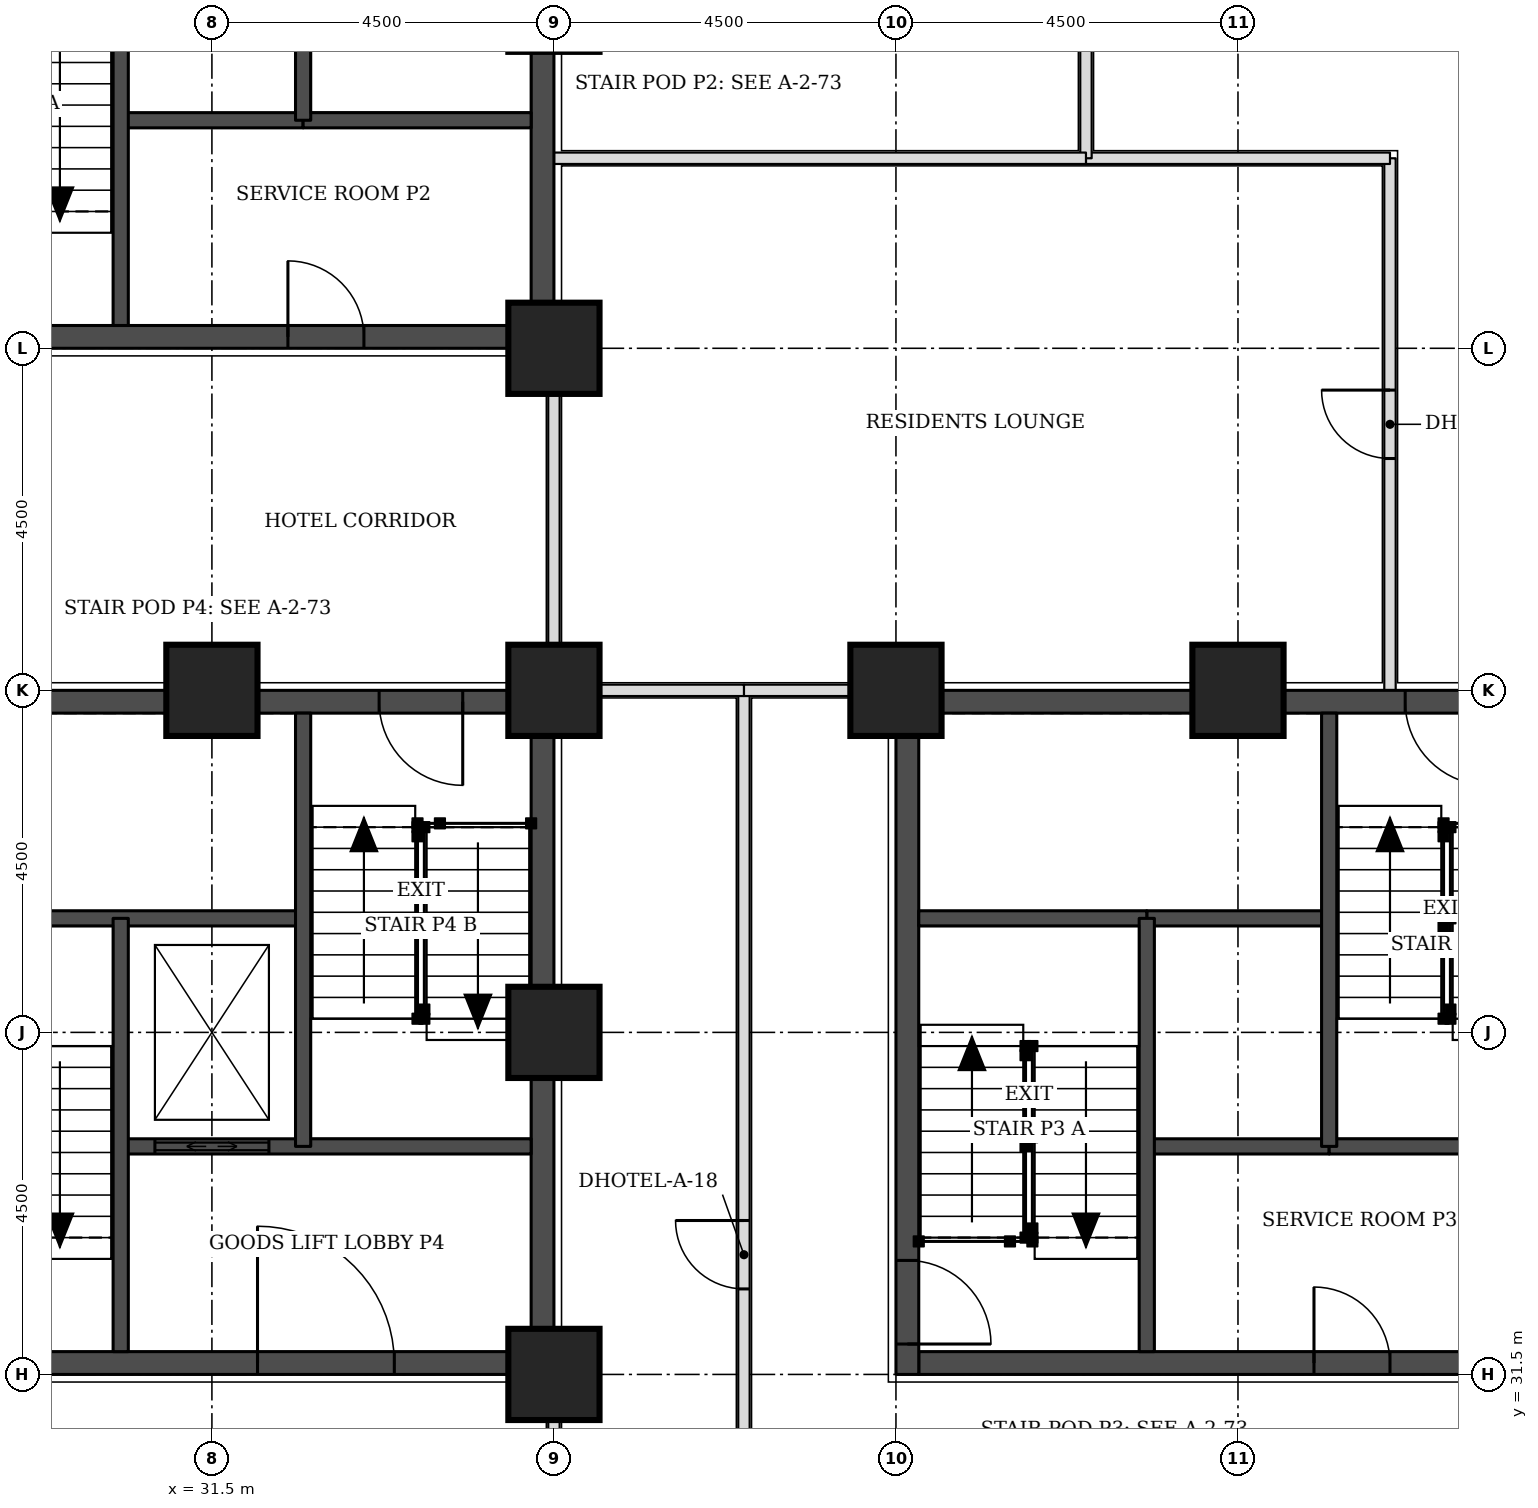
"""IFC4 building model, lengths in metres.
Left out: names, types, materials, properties, quantities, classifications, styles, units other than length and angle.
Written with IfcOpenShell. Run it as: python <this file> out.ifc"""

import sys

from ifc_helpers import new_model, si_unit, direction, frame, frame_2d, origin, origin_2d, place, context, subcontext, project, spatial, rectangle, extrude, element, fill, save


model = new_model("IFC4")
c1 = context("Model", 3, precision=1e-05, world=origin(), true_north=direction((0.0, 1.0)))
c2 = subcontext(c1, "Body", "Model", "MODEL_VIEW")
j1 = project(units=[si_unit("LENGTHUNIT", "METRE"), si_unit("PLANEANGLEUNIT", "RADIAN")], contexts=[c1])
p1 = place(None, origin())
s1 = spatial("IfcSite", under=j1, at=p1, CompositionType="ELEMENT")
p2 = place(p1, origin())
s2 = spatial("IfcBuilding", under=s1, at=p2, CompositionType="ELEMENT")
p3 = place(p2, frame((0.0, 0.0, 26.4)))
s3 = spatial("IfcBuildingStorey", under=s2, at=p3, CompositionType="ELEMENT", Elevation=26.4)
for number, where, z_axis, x_axis in (
    (1, (36.0, 31.5, 0.0), (0.0, 0.0, 1.0), (1.0, 0.0, 0.0)),
    (2, (36.0, 36.0, 0.0), (0.0, 0.0, 1.0), (1.0, 0.0, 0.0)),
    (3, (31.5, 40.5, 0.0), (0.0, 0.0, 1.0), (1.0, 0.0, 0.0)),
    (4, (36.0, 40.5, 0.0), (0.0, 0.0, 1.0), (1.0, 0.0, 0.0)),
    (5, (40.5, 40.5, 0.0), (0.0, 0.0, 1.0), (1.0, 0.0, 0.0)),
    (6, (45.0, 40.5, 0.0), (0.0, 0.0, 1.0), (1.0, 0.0, 0.0)),
    (7, (36.0, 45.0, 0.0), (0.0, 0.0, 1.0), (1.0, 0.0, 0.0)),
):
    element("IfcColumn", number, at=place(p3, frame(where, z_axis=z_axis, x_axis=x_axis)), inside=s3, PredefinedType="COLUMN", context=c2, shape_type="SweptSolid", body=[
        extrude(rectangle(XDim=1.2, YDim=1.2, at=origin_2d()), origin(), (0.0, 0.0, 1.0), 3.3),
    ])
p4 = place(p3, frame((27.3, 45.15, 0.0), z_axis=(0.0, 0.0, 1.0), x_axis=(1.0, 0.0, 0.0)))
e8 = element("IfcWall", 8, at=p4, inside=s3, PredefinedType="SHEAR", context=c2, shape_type="SweptSolid", body=[
    extrude(rectangle(XDim=8.4, YDim=0.3, at=frame_2d((4.2, 0.0))), origin(), (0.0, 0.0, 1.0), 3.3),
])
p5 = place(p4, frame((5.2, 0.0, 0.0)))
e9 = element("IfcOpeningElement", 9, at=p5, cuts=e8, PredefinedType="OPENING", context=c2, shape_type="SweptSolid", body=[
    extrude(rectangle(XDim=1.0, YDim=2.1, at=frame_2d((0.5, 1.05))), frame((0.0, 0.16, 0.0), z_axis=(0.0, -1.0, 0.0), x_axis=(1.0, 0.0, 0.0)), (0.0, 0.0, 1.0), 0.32),
])
p6 = place(p3, frame((35.85, 45.0, 0.0), z_axis=(0.0, 0.0, 1.0), x_axis=(0.0, 1.0, 0.0)))
e10 = element("IfcWall", 10, at=p6, inside=s3, PredefinedType="SHEAR", context=c2, shape_type="SweptSolid", body=[
    extrude(rectangle(XDim=9.0, YDim=0.3, at=frame_2d((4.5, 0.0))), origin(), (0.0, 0.0, 1.0), 3.3),
])
p7 = place(p3, frame((40.8, 31.65, 0.0), z_axis=(0.0, 0.0, 1.0), x_axis=(1.0, 0.0, 0.0)))
e11 = element("IfcWall", 11, at=p7, inside=s3, PredefinedType="SHEAR", context=c2, shape_type="SweptSolid", body=[
    extrude(rectangle(XDim=8.4, YDim=0.3, at=frame_2d((4.2, 0.0))), origin(), (0.0, 0.0, 1.0), 3.3),
])
p8 = place(p7, frame((5.2, 0.0, 0.0)))
e12 = element("IfcOpeningElement", 12, at=p8, cuts=e11, PredefinedType="OPENING", context=c2, shape_type="SweptSolid", body=[
    extrude(rectangle(XDim=1.0, YDim=2.1, at=frame_2d((0.5, 1.05))), frame((0.0, 0.16, 0.0), z_axis=(0.0, -1.0, 0.0), x_axis=(1.0, 0.0, 0.0)), (0.0, 0.0, 1.0), 0.32),
])
p9 = place(p3, frame((40.8, 40.35, 0.0), z_axis=(0.0, 0.0, 1.0), x_axis=(1.0, 0.0, 0.0)))
e13 = element("IfcWall", 13, at=p9, inside=s3, PredefinedType="SHEAR", context=c2, shape_type="SweptSolid", body=[
    extrude(rectangle(XDim=8.4, YDim=0.3, at=frame_2d((4.2, 0.0))), origin(), (0.0, 0.0, 1.0), 3.3),
])
p10 = place(p9, frame((6.4, 0.0, 0.0)))
e14 = element("IfcOpeningElement", 14, at=p10, cuts=e13, PredefinedType="OPENING", context=c2, shape_type="SweptSolid", body=[
    extrude(rectangle(XDim=1.1, YDim=2.1, at=frame_2d((0.55, 1.05))), frame((0.0, 0.16, 0.0), z_axis=(0.0, -1.0, 0.0), x_axis=(1.0, 0.0, 0.0)), (0.0, 0.0, 1.0), 0.32),
])
p11 = place(p3, frame((40.65, 31.5, 0.0), z_axis=(0.0, 0.0, 1.0), x_axis=(0.0, 1.0, 0.0)))
e15 = element("IfcWall", 15, at=p11, inside=s3, PredefinedType="SHEAR", context=c2, shape_type="SweptSolid", body=[
    extrude(rectangle(XDim=9.0, YDim=0.3, at=frame_2d((4.5, 0.0))), origin(), (0.0, 0.0, 1.0), 3.3),
])
p12 = place(p11, frame((0.4, 0.0, 0.0)))
e16 = element("IfcOpeningElement", 16, at=p12, cuts=e15, PredefinedType="OPENING", context=c2, shape_type="SweptSolid", body=[
    extrude(rectangle(XDim=1.1, YDim=2.1, at=frame_2d((0.55, 1.05))), frame((0.0, 0.16, 0.0), z_axis=(0.0, -1.0, 0.0), x_axis=(1.0, 0.0, 0.0)), (0.0, 0.0, 1.0), 0.32),
])
p13 = place(p3, frame((27.3, 31.65, 0.0), z_axis=(0.0, 0.0, 1.0), x_axis=(1.0, 0.0, 0.0)))
e17 = element("IfcWall", 17, at=p13, inside=s3, PredefinedType="SHEAR", context=c2, shape_type="SweptSolid", body=[
    extrude(rectangle(XDim=8.4, YDim=0.3, at=frame_2d((4.2, 0.0))), origin(), (0.0, 0.0, 1.0), 3.3),
])
p14 = place(p13, frame((4.8, 0.0, 0.0)))
e18 = element("IfcOpeningElement", 18, at=p14, cuts=e17, PredefinedType="OPENING", context=c2, shape_type="SweptSolid", body=[
    extrude(rectangle(XDim=1.8, YDim=2.1, at=frame_2d((0.9, 1.05))), frame((0.0, 0.16, 0.0), z_axis=(0.0, -1.0, 0.0), x_axis=(1.0, 0.0, 0.0)), (0.0, 0.0, 1.0), 0.32),
])
p15 = place(p3, frame((27.3, 40.35, 0.0), z_axis=(0.0, 0.0, 1.0), x_axis=(1.0, 0.0, 0.0)))
e19 = element("IfcWall", 19, at=p15, inside=s3, PredefinedType="SHEAR", context=c2, shape_type="SweptSolid", body=[
    extrude(rectangle(XDim=8.4, YDim=0.3, at=frame_2d((4.2, 0.0))), origin(), (0.0, 0.0, 1.0), 3.3),
])
p16 = place(p15, frame((6.4, 0.0, 0.0)))
e20 = element("IfcOpeningElement", 20, at=p16, cuts=e19, PredefinedType="OPENING", context=c2, shape_type="SweptSolid", body=[
    extrude(rectangle(XDim=1.1, YDim=2.1, at=frame_2d((0.55, 1.05))), frame((0.0, 0.16, 0.0), z_axis=(0.0, -1.0, 0.0), x_axis=(1.0, 0.0, 0.0)), (0.0, 0.0, 1.0), 0.32),
])
p17 = place(p3, frame((35.85, 31.5, 0.0), z_axis=(0.0, 0.0, 1.0), x_axis=(0.0, 1.0, 0.0)))
e21 = element("IfcWall", 21, at=p17, inside=s3, PredefinedType="SHEAR", context=c2, shape_type="SweptSolid", body=[
    extrude(rectangle(XDim=9.0, YDim=0.3, at=frame_2d((4.5, 0.0))), origin(), (0.0, 0.0, 1.0), 3.3),
])
p18 = place(p3, frame((38.5, 25.65, 0.0), z_axis=(0.0, 0.0, 1.0), x_axis=(0.0, 1.0, 0.0)))
e22 = element("IfcWall", 22, at=p18, inside=s3, PredefinedType="PARTITIONING", context=c2, shape_type="SweptSolid", body=[
    extrude(rectangle(XDim=14.85, YDim=0.15, at=frame_2d((7.425, 0.0))), origin(), (0.0, 0.0, 1.0), 3.08),
])
p19 = place(p18, frame((6.975, 0.0, 0.0)))
e23 = element("IfcOpeningElement", 23, at=p19, cuts=e22, PredefinedType="OPENING", context=c2, shape_type="SweptSolid", body=[
    extrude(rectangle(XDim=0.9, YDim=2.1, at=frame_2d((0.45, 1.05))), frame((0.0, 0.085, 0.0), z_axis=(0.0, -1.0, 0.0), x_axis=(1.0, 0.0, 0.0)), (0.0, 0.0, 1.0), 0.17),
])
for number, where, z_axis, x_axis in (
    (24, (36.0, 29.5, 0.0), (0.0, 0.0, 1.0), (0.0, 1.0, 0.0)),
    (25, (38.5, 40.5, 0.0), (0.0, 0.0, 1.0), (1.0, 0.0, 0.0)),
):
    element("IfcWall", number, at=place(p3, frame(where, z_axis=z_axis, x_axis=x_axis)), inside=s3, PredefinedType="PARTITIONING", context=c2, shape_type="SweptSolid", body=[
        extrude(rectangle(XDim=1.95, YDim=0.15, at=frame_2d((0.975, 0.0))), origin(), (0.0, 0.0, 1.0), 2.33),
    ])
p20 = place(p3, frame((36.0, 40.55, 0.0), z_axis=(0.0, 0.0, 1.0), x_axis=(0.0, 1.0, 0.0)))
e26 = element("IfcWall", 26, at=p20, inside=s3, PredefinedType="PARTITIONING", context=c2, shape_type="SweptSolid", body=[
    extrude(rectangle(XDim=4.4, YDim=0.15, at=frame_2d((2.2, 0.0))), origin(), (0.0, 0.0, 1.0), 2.33),
])
p21 = place(p3, frame((47.0, 40.5, 0.0), z_axis=(0.0, 0.0, 1.0), x_axis=(0.0, 1.0, 0.0)))
e27 = element("IfcWall", 27, at=p21, inside=s3, PredefinedType="PARTITIONING", context=c2, shape_type="SweptSolid", body=[
    extrude(rectangle(XDim=7.0, YDim=0.15, at=frame_2d((3.5, 0.0))), origin(), (0.0, 0.0, 1.0), 3.08),
])
p22 = place(p21, frame((3.05, 0.0, 0.0)))
e28 = element("IfcOpeningElement", 28, at=p22, cuts=e27, PredefinedType="OPENING", context=c2, shape_type="SweptSolid", body=[
    extrude(rectangle(XDim=0.9, YDim=2.1, at=frame_2d((0.45, 1.05))), frame((0.0, 0.085, 0.0), z_axis=(0.0, -1.0, 0.0), x_axis=(1.0, 0.0, 0.0)), (0.0, 0.0, 1.0), 0.17),
])
p23 = place(p3, frame((43.0, 47.5, 0.0), z_axis=(0.0, 0.0, 1.0), x_axis=(1.0, 0.0, 0.0)))
e29 = element("IfcWall", 29, at=p23, inside=s3, PredefinedType="PARTITIONING", context=c2, shape_type="SweptSolid", body=[
    extrude(rectangle(XDim=4.0, YDim=0.15, at=frame_2d((2.0, 0.0))), origin(), (0.0, 0.0, 1.0), 3.08),
])
p24 = place(p3, frame((43.0, 47.5, 0.0), z_axis=(0.0, 0.0, 1.0), x_axis=(0.0, 1.0, 0.0)))
e30 = element("IfcWall", 30, at=p24, inside=s3, PredefinedType="PARTITIONING", context=c2, shape_type="SweptSolid", body=[
    extrude(rectangle(XDim=6.5, YDim=0.15, at=frame_2d((3.25, 0.0))), origin(), (0.0, 0.0, 1.0), 3.08),
])
p25 = place(p3, frame((36.05, 40.5, 0.0), z_axis=(0.0, 0.0, 1.0), x_axis=(1.0, 0.0, 0.0)))
e31 = element("IfcWall", 31, at=p25, inside=s3, PredefinedType="PARTITIONING", context=c2, shape_type="SweptSolid", body=[
    extrude(rectangle(XDim=2.45, YDim=0.15, at=frame_2d((1.225, 0.0))), origin(), (0.0, 0.0, 1.0), 2.33),
])
p26 = place(p3, frame((36.0, 47.5, 0.0), z_axis=(0.0, 0.0, 1.0), x_axis=(1.0, 0.0, 0.0)))
e32 = element("IfcWall", 32, at=p26, inside=s3, PredefinedType="PARTITIONING", context=c2, shape_type="SweptSolid", body=[
    extrude(rectangle(XDim=7.0, YDim=0.15, at=frame_2d((3.5, 0.0))), origin(), (0.0, 0.0, 1.0), 3.08),
])
p27 = place(p3, frame((30.3, 48.0, 0.0), z_axis=(0.0, 0.0, 1.0), x_axis=(1.0, 0.0, 0.0)))
e33 = element("IfcWall", 33, at=p27, inside=s3, PredefinedType="SOLIDWALL", context=c2, shape_type="SweptSolid", body=[
    extrude(rectangle(XDim=2.4, YDim=0.2, at=frame_2d((1.2, 0.0))), origin(), (0.0, 0.0, 1.0), 3.08),
])
p28 = place(p3, frame((32.7, 48.0, 0.0), z_axis=(0.0, 0.0, 1.0), x_axis=(1.0, 0.0, 0.0)))
e34 = element("IfcWall", 34, at=p28, inside=s3, PredefinedType="SOLIDWALL", context=c2, shape_type="SweptSolid", body=[
    extrude(rectangle(XDim=3.0, YDim=0.2, at=frame_2d((1.5, 0.0))), origin(), (0.0, 0.0, 1.0), 3.08),
])
for number, where, z_axis, x_axis in (
    (35, (30.3, 45.3, 0.0), (0.0, 0.0, 1.0), (0.0, 1.0, 0.0)),
    (36, (32.7, 48.0, 0.0), (0.0, 0.0, 1.0), (0.0, 1.0, 0.0)),
):
    element("IfcWall", number, at=place(p3, frame(where, z_axis=z_axis, x_axis=x_axis)), inside=s3, PredefinedType="SOLIDWALL", context=c2, shape_type="SweptSolid", body=[
        extrude(rectangle(XDim=5.7, YDim=0.2, at=frame_2d((2.85, 0.0))), origin(), (0.0, 0.0, 1.0), 3.08),
    ])
p29 = place(p3, frame((43.8, 34.5, 0.0), z_axis=(0.0, 0.0, 1.0), x_axis=(1.0, 0.0, 0.0)))
e37 = element("IfcWall", 37, at=p29, inside=s3, PredefinedType="SOLIDWALL", context=c2, shape_type="SweptSolid", body=[
    extrude(rectangle(XDim=2.4, YDim=0.2, at=frame_2d((1.2, 0.0))), origin(), (0.0, 0.0, 1.0), 3.08),
])
p30 = place(p3, frame((46.2, 34.5, 0.0), z_axis=(0.0, 0.0, 1.0), x_axis=(1.0, 0.0, 0.0)))
e38 = element("IfcWall", 38, at=p30, inside=s3, PredefinedType="SOLIDWALL", context=c2, shape_type="SweptSolid", body=[
    extrude(rectangle(XDim=3.0, YDim=0.2, at=frame_2d((1.5, 0.0))), origin(), (0.0, 0.0, 1.0), 3.08),
])
p31 = place(p3, frame((43.8, 37.5, 0.0), z_axis=(0.0, 0.0, 1.0), x_axis=(1.0, 0.0, 0.0)))
e39 = element("IfcWall", 39, at=p31, inside=s3, PredefinedType="SOLIDWALL", context=c2, shape_type="SweptSolid", body=[
    extrude(rectangle(XDim=2.4, YDim=0.2, at=frame_2d((1.2, 0.0))), origin(), (0.0, 0.0, 1.0), 3.3),
])
p32 = place(p3, frame((40.8, 37.5, 0.0), z_axis=(0.0, 0.0, 1.0), x_axis=(1.0, 0.0, 0.0)))
e40 = element("IfcWall", 40, at=p32, inside=s3, PredefinedType="SOLIDWALL", context=c2, shape_type="SweptSolid", body=[
    extrude(rectangle(XDim=3.0, YDim=0.2, at=frame_2d((1.5, 0.0))), origin(), (0.0, 0.0, 1.0), 3.08),
])
for number, where, z_axis, x_axis in (
    (41, (43.8, 31.8, 0.0), (0.0, 0.0, 1.0), (0.0, 1.0, 0.0)),
    (42, (46.2, 34.5, 0.0), (0.0, 0.0, 1.0), (0.0, 1.0, 0.0)),
):
    element("IfcWall", number, at=place(p3, frame(where, z_axis=z_axis, x_axis=x_axis)), inside=s3, PredefinedType="SOLIDWALL", context=c2, shape_type="SweptSolid", body=[
        extrude(rectangle(XDim=5.7, YDim=0.2, at=frame_2d((2.85, 0.0))), origin(), (0.0, 0.0, 1.0), 3.08),
    ])
p33 = place(p3, frame((30.3, 34.5, 0.0), z_axis=(0.0, 0.0, 1.0), x_axis=(1.0, 0.0, 0.0)))
e43 = element("IfcWall", 43, at=p33, inside=s3, PredefinedType="SOLIDWALL", context=c2, shape_type="SweptSolid", body=[
    extrude(rectangle(XDim=5.4, YDim=0.2, at=frame_2d((2.7, 0.0))), origin(), (0.0, 0.0, 1.0), 3.08),
])
p34 = place(p33, frame((0.45, 0.0, 0.0)))
e44 = element("IfcOpeningElement", 44, at=p34, cuts=e43, PredefinedType="OPENING", context=c2, shape_type="SweptSolid", body=[
    extrude(rectangle(XDim=1.5, YDim=2.1, at=frame_2d((0.75, 1.05))), frame((0.0, 0.11, 0.0), z_axis=(0.0, -1.0, 0.0), x_axis=(1.0, 0.0, 0.0)), (0.0, 0.0, 1.0), 0.22),
])
p35 = place(p3, frame((27.3, 37.5, 0.0), z_axis=(0.0, 0.0, 1.0), x_axis=(1.0, 0.0, 0.0)))
e45 = element("IfcWall", 45, at=p35, inside=s3, PredefinedType="SOLIDWALL", context=c2, shape_type="SweptSolid", body=[
    extrude(rectangle(XDim=5.4, YDim=0.2, at=frame_2d((2.7, 0.0))), origin(), (0.0, 0.0, 1.0), 3.08),
])
for number, where, z_axis, x_axis in (
    (46, (30.3, 31.8, 0.0), (0.0, 0.0, 1.0), (0.0, 1.0, 0.0)),
    (47, (32.7, 34.5, 0.0), (0.0, 0.0, 1.0), (0.0, 1.0, 0.0)),
):
    element("IfcWall", number, at=place(p3, frame(where, z_axis=z_axis, x_axis=x_axis)), inside=s3, PredefinedType="SOLIDWALL", context=c2, shape_type="SweptSolid", body=[
        extrude(rectangle(XDim=5.7, YDim=0.2, at=frame_2d((2.85, 0.0))), origin(), (0.0, 0.0, 1.0), 3.08),
    ])
p36 = place(p19, origin())
e48 = element("IfcDoor", 48, at=p36, inside=s3, OperationType="SINGLE_SWING_RIGHT", PredefinedType="DOOR", context=c2, shape_type="SweptSolid", body=[
    extrude(rectangle(XDim=0.9, YDim=2.1, at=frame_2d((0.45, 1.05))), frame((0.0, 0.025, 0.0), z_axis=(0.0, -1.0, 0.0), x_axis=(1.0, 0.0, 0.0)), (0.0, 0.0, 1.0), 0.05),
])
fill(e23, e48)
p37 = place(p22, origin())
e49 = element("IfcDoor", 49, at=p37, inside=s3, OperationType="SINGLE_SWING_RIGHT", PredefinedType="DOOR", context=c2, shape_type="SweptSolid", body=[
    extrude(rectangle(XDim=0.9, YDim=2.1, at=frame_2d((0.45, 1.05))), frame((0.0, 0.025, 0.0), z_axis=(0.0, -1.0, 0.0), x_axis=(1.0, 0.0, 0.0)), (0.0, 0.0, 1.0), 0.05),
])
fill(e28, e49)
p38 = place(p5, origin())
e50 = element("IfcDoor", 50, at=p38, inside=s3, OperationType="SINGLE_SWING_LEFT", PredefinedType="DOOR", context=c2, shape_type="SweptSolid", body=[
    extrude(rectangle(XDim=1.0, YDim=2.1, at=frame_2d((0.5, 1.05))), frame((0.0, 0.025, 0.0), z_axis=(0.0, -1.0, 0.0), x_axis=(1.0, 0.0, 0.0)), (0.0, 0.0, 1.0), 0.05),
])
fill(e9, e50)
p39 = place(p12, frame((1.1, 0.0, 0.0), z_axis=(0.0, 0.0, 1.0), x_axis=(-1.0, 0.0, 0.0)))
e51 = element("IfcDoor", 51, at=p39, inside=s3, OperationType="SINGLE_SWING_RIGHT", PredefinedType="DOOR", context=c2, shape_type="SweptSolid", body=[
    extrude(rectangle(XDim=1.1, YDim=2.1, at=frame_2d((0.55, 1.05))), frame((0.0, 0.025, 0.0), z_axis=(0.0, -1.0, 0.0), x_axis=(1.0, 0.0, 0.0)), (0.0, 0.0, 1.0), 0.05),
])
fill(e16, e51)
p40 = place(p10, frame((1.1, 0.0, 0.0), z_axis=(0.0, 0.0, 1.0), x_axis=(-1.0, 0.0, 0.0)))
e52 = element("IfcDoor", 52, at=p40, inside=s3, OperationType="SINGLE_SWING_LEFT", PredefinedType="DOOR", context=c2, shape_type="SweptSolid", body=[
    extrude(rectangle(XDim=1.1, YDim=2.1, at=frame_2d((0.55, 1.05))), frame((0.0, 0.025, 0.0), z_axis=(0.0, -1.0, 0.0), x_axis=(1.0, 0.0, 0.0)), (0.0, 0.0, 1.0), 0.05),
])
fill(e14, e52)
p41 = place(p8, origin())
e53 = element("IfcDoor", 53, at=p41, inside=s3, OperationType="SINGLE_SWING_LEFT", PredefinedType="DOOR", context=c2, shape_type="SweptSolid", body=[
    extrude(rectangle(XDim=1.0, YDim=2.1, at=frame_2d((0.5, 1.05))), frame((0.0, 0.025, 0.0), z_axis=(0.0, -1.0, 0.0), x_axis=(1.0, 0.0, 0.0)), (0.0, 0.0, 1.0), 0.05),
])
fill(e12, e53)
p42 = place(p16, frame((1.1, 0.0, 0.0), z_axis=(0.0, 0.0, 1.0), x_axis=(-1.0, 0.0, 0.0)))
e54 = element("IfcDoor", 54, at=p42, inside=s3, OperationType="SINGLE_SWING_LEFT", PredefinedType="DOOR", context=c2, shape_type="SweptSolid", body=[
    extrude(rectangle(XDim=1.1, YDim=2.1, at=frame_2d((0.55, 1.05))), frame((0.0, 0.025, 0.0), z_axis=(0.0, -1.0, 0.0), x_axis=(1.0, 0.0, 0.0)), (0.0, 0.0, 1.0), 0.05),
])
fill(e20, e54)
p43 = place(p34, origin())
e55 = element("IfcDoor", 55, at=p43, inside=s3, OperationType="DOUBLE_DOOR_SLIDING", PredefinedType="DOOR", context=c2, shape_type="SweptSolid", body=[
    extrude(rectangle(XDim=1.5, YDim=2.1, at=frame_2d((0.75, 1.05))), frame((0.0, 0.025, 0.0), z_axis=(0.0, -1.0, 0.0), x_axis=(1.0, 0.0, 0.0)), (0.0, 0.0, 1.0), 0.05),
])
fill(e44, e55)
p44 = place(p14, origin())
e56 = element("IfcDoor", 56, at=p44, inside=s3, OperationType="SINGLE_SWING_LEFT", PredefinedType="DOOR", context=c2, shape_type="SweptSolid", body=[
    extrude(rectangle(XDim=1.8, YDim=2.1, at=frame_2d((0.9, 1.05))), frame((0.0, 0.025, 0.0), z_axis=(0.0, -1.0, 0.0), x_axis=(1.0, 0.0, 0.0)), (0.0, 0.0, 1.0), 0.05),
])
fill(e18, e56)
save(model, sys.argv[1])
